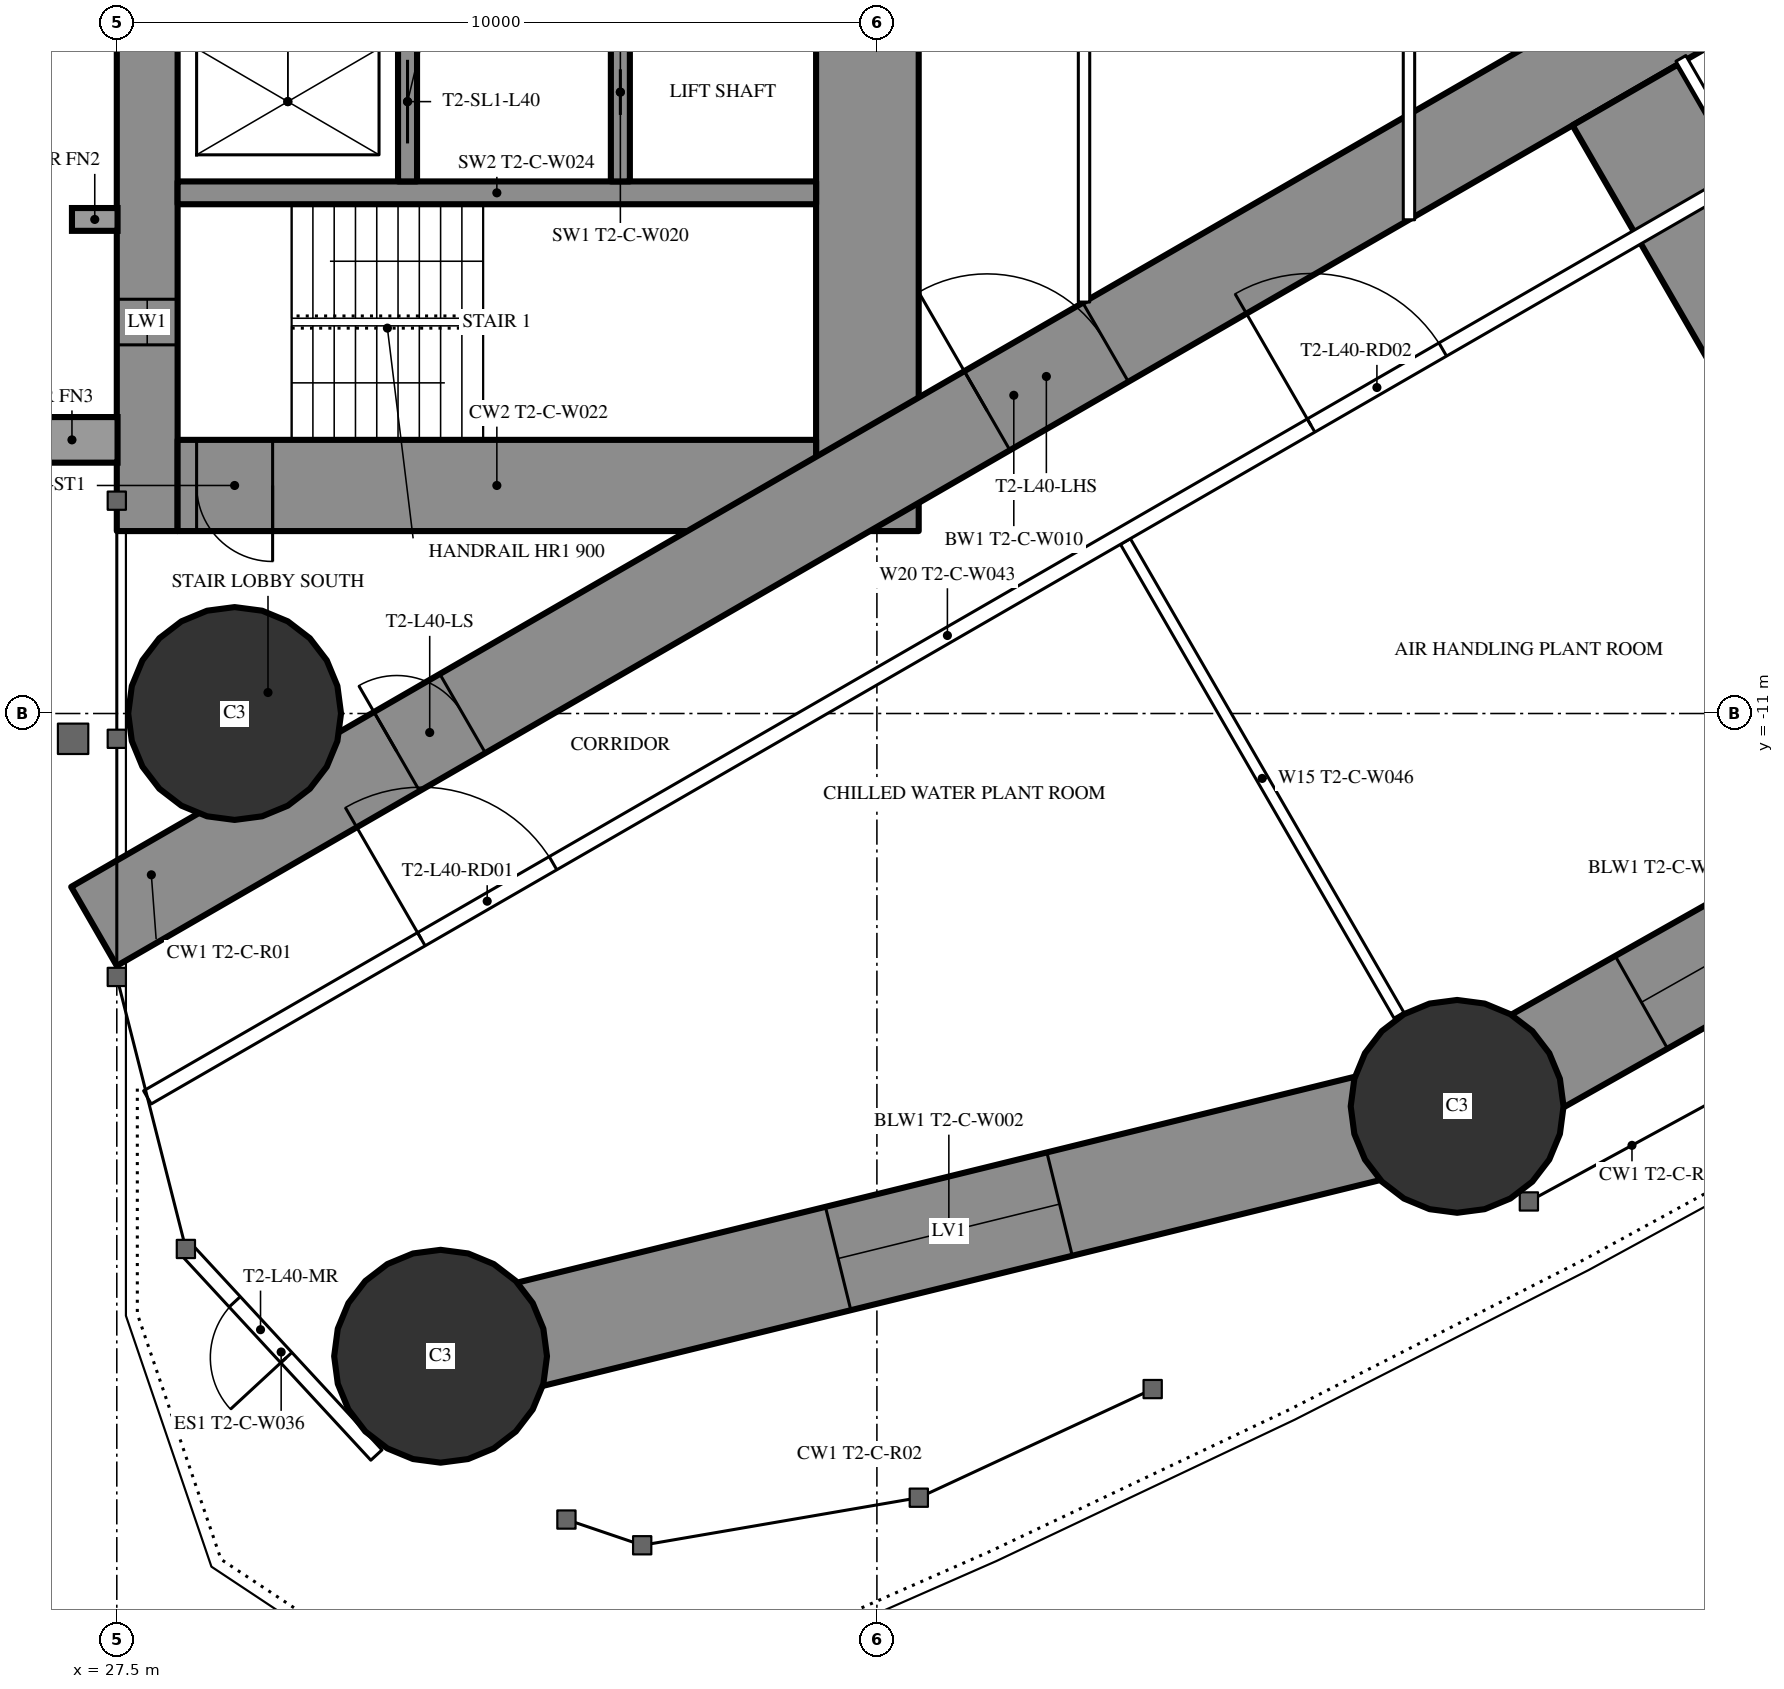
"""IFC4 building model, lengths in metres.
Left out: names, types, materials, properties, quantities, classifications, styles, units other than length and angle.
Written with IfcOpenShell. Run it as: python <this file> out.ifc"""

import sys

from ifc_helpers import new_model, si_unit, direction, frame, frame_2d, origin, origin_2d, place, context, subcontext, project, spatial, rectangle, circle, extrude, element, fill, save


model = new_model("IFC4")
c1 = context("Model", 3, precision=1e-05, world=origin(), true_north=direction((0.0, 1.0)))
c2 = subcontext(c1, "Body", "Model", "MODEL_VIEW")
j1 = project(units=[si_unit("LENGTHUNIT", "METRE"), si_unit("PLANEANGLEUNIT", "RADIAN")], contexts=[c1])
p1 = place(None, origin())
s1 = spatial("IfcSite", under=j1, at=p1, CompositionType="ELEMENT")
p2 = place(p1, origin())
s2 = spatial("IfcBuilding", under=s1, at=p2, CompositionType="ELEMENT")
p3 = place(p2, frame((0.0, 0.0, 152.7)))
s3 = spatial("IfcBuildingStorey", under=s2, at=p3, CompositionType="ELEMENT", Elevation=152.7)
for number, where, z_axis, x_axis in (
    (1, (31.76, -19.456, 0.0), (0.0, 0.0, 1.0), (1.0, 0.0, 0.0)),
    (2, (29.05, -11.0, 0.0), (0.0, 0.0, 1.0), (1.0, 0.0, 0.0)),
    (3, (45.134, -16.168, 0.0), (0.0, 0.0, 1.0), (1.0, 0.0, 0.0)),
):
    element("IfcColumn", number, at=place(p3, frame(where, z_axis=z_axis, x_axis=x_axis)), inside=s3, PredefinedType="COLUMN", context=c2, shape_type="SweptSolid", body=[
        extrude(circle(Radius=1.4, at=origin_2d()), origin(), (0.0, 0.0, 1.0), 3.6),
    ])
p4 = place(p3, frame((27.9, -8.6, 0.0), z_axis=(0.0, 0.0, 1.0), x_axis=(0.0, 1.0, 0.0)))
e4 = element("IfcWall", 4, at=p4, inside=s3, PredefinedType="SHEAR", context=c2, shape_type="SweptSolid", body=[
    extrude(rectangle(XDim=17.2, YDim=0.8, at=frame_2d((8.6, 0.0))), origin(), (0.0, 0.0, 1.0), 3.6),
])
p5 = place(p4, frame((2.45, 0.0, 0.6)))
e5 = element("IfcOpeningElement", 5, at=p5, cuts=e4, PredefinedType="OPENING", context=c2, shape_type="SweptSolid", body=[
    extrude(rectangle(XDim=0.6, YDim=2.1, at=frame_2d((0.3, 1.05))), frame((0.0, 0.41, 0.0), z_axis=(0.0, -1.0, 0.0), x_axis=(1.0, 0.0, 0.0)), (0.0, 0.0, 1.0), 0.82),
])
p6 = place(p4, frame((14.15, 0.0, 0.6)))
e6 = element("IfcOpeningElement", 6, at=p6, cuts=e4, PredefinedType="OPENING", context=c2, shape_type="SweptSolid", body=[
    extrude(rectangle(XDim=0.6, YDim=2.1, at=frame_2d((0.3, 1.05))), frame((0.0, 0.41, 0.0), z_axis=(0.0, -1.0, 0.0), x_axis=(1.0, 0.0, 0.0)), (0.0, 0.0, 1.0), 0.82),
])
p7 = place(p3, frame((37.375, -8.6, 0.0), z_axis=(0.0, 0.0, 1.0), x_axis=(0.0, 1.0, 0.0)))
e7 = element("IfcWall", 7, at=p7, inside=s3, PredefinedType="SHEAR", context=c2, shape_type="SweptSolid", body=[
    extrude(rectangle(XDim=17.2, YDim=1.35, at=frame_2d((8.6, 0.0))), origin(), (0.0, 0.0, 1.0), 3.6),
])
p8 = place(p7, frame((7.7, 0.0, 0.0)))
e8 = element("IfcOpeningElement", 8, at=p8, cuts=e7, PredefinedType="OPENING", context=c2, shape_type="SweptSolid", body=[
    extrude(rectangle(XDim=1.8, YDim=2.2, at=frame_2d((0.9, 1.1))), frame((0.0, 0.685, 0.0), z_axis=(0.0, -1.0, 0.0), x_axis=(1.0, 0.0, 0.0)), (0.0, 0.0, 1.0), 1.37),
])
p9 = place(p3, frame((28.3, -8.0, 0.0), z_axis=(0.0, 0.0, 1.0), x_axis=(1.0, 0.0, 0.0)))
e9 = element("IfcWall", 9, at=p9, inside=s3, PredefinedType="SHEAR", context=c2, shape_type="SweptSolid", body=[
    extrude(rectangle(XDim=8.4, YDim=1.2, at=frame_2d((4.2, 0.0))), origin(), (0.0, 0.0, 1.0), 3.6),
])
p10 = place(p9, frame((0.25, 0.0, 0.0)))
e10 = element("IfcOpeningElement", 10, at=p10, cuts=e9, PredefinedType="OPENING", context=c2, shape_type="SweptSolid", body=[
    extrude(rectangle(XDim=1.0, YDim=2.2, at=frame_2d((0.5, 1.1))), frame((0.0, 0.61, 0.0), z_axis=(0.0, -1.0, 0.0), x_axis=(1.0, 0.0, 0.0)), (0.0, 0.0, 1.0), 1.22),
])
p11 = place(p3, frame((28.3, -4.15, 0.0), z_axis=(0.0, 0.0, 1.0), x_axis=(1.0, 0.0, 0.0)))
e11 = element("IfcWall", 11, at=p11, inside=s3, PredefinedType="SHEAR", context=c2, shape_type="SweptSolid", body=[
    extrude(rectangle(XDim=8.4, YDim=0.3, at=frame_2d((4.2, 0.0))), origin(), (0.0, 0.0, 1.0), 3.6),
])
p12 = place(p3, frame((31.325, -4.0, 0.0), z_axis=(0.0, 0.0, 1.0), x_axis=(0.0, 1.0, 0.0)))
e12 = element("IfcWall", 12, at=p12, inside=s3, PredefinedType="SHEAR", context=c2, shape_type="SweptSolid", body=[
    extrude(rectangle(XDim=2.1, YDim=0.25, at=frame_2d((1.05, 0.0))), origin(), (0.0, 0.0, 1.0), 3.6),
])
p13 = place(p12, frame((0.5, 0.0, 0.0)))
e13 = element("IfcOpeningElement", 13, at=p13, cuts=e12, PredefinedType="OPENING", context=c2, shape_type="SweptSolid", body=[
    extrude(rectangle(XDim=1.1, YDim=2.2, at=frame_2d((0.55, 1.1))), frame((0.0, 0.135, 0.0), z_axis=(0.0, -1.0, 0.0), x_axis=(1.0, 0.0, 0.0)), (0.0, 0.0, 1.0), 0.27),
])
p14 = place(p3, frame((34.125, -4.0, 0.0), z_axis=(0.0, 0.0, 1.0), x_axis=(0.0, 1.0, 0.0)))
e14 = element("IfcWall", 14, at=p14, inside=s3, PredefinedType="SHEAR", context=c2, shape_type="SweptSolid", body=[
    extrude(rectangle(XDim=2.35, YDim=0.25, at=frame_2d((1.175, 0.0))), origin(), (0.0, 0.0, 1.0), 3.6),
])
p15 = place(p14, frame((0.875, 0.0, 0.0)))
e15 = element("IfcOpeningElement", 15, at=p15, cuts=e14, PredefinedType="OPENING", context=c2, shape_type="SweptSolid", body=[
    extrude(rectangle(XDim=0.6, YDim=2.0, at=frame_2d((0.3, 1.0))), frame((0.0, 0.135, 0.0), z_axis=(0.0, -1.0, 0.0), x_axis=(1.0, 0.0, 0.0)), (0.0, 0.0, 1.0), 0.27),
])
p16 = place(p3, frame((27.2, -13.8, 0.0), z_axis=(0.0, 0.0, 1.0), x_axis=(0.866027159892, 0.499996958321, 0.0)))
e16 = element("IfcWall", 16, at=p16, inside=s3, PredefinedType="SHEAR", context=c2, shape_type="SweptSolid", body=[
    extrude(rectangle(XDim=27.947, YDim=1.2, at=frame_2d((13.973, 0.0))), origin(), (0.0, 0.0, 1.0), 3.6),
])
p17 = place(p16, frame((4.6, 0.0, 0.0)))
e17 = element("IfcOpeningElement", 17, at=p17, cuts=e16, PredefinedType="OPENING", context=c2, shape_type="SweptSolid", body=[
    extrude(rectangle(XDim=1.0, YDim=2.2, at=frame_2d((0.5, 1.1))), frame((0.0, 0.61, 0.0), z_axis=(0.0, -1.0, 0.0), x_axis=(1.0, 0.0, 0.0)), (0.0, 0.0, 1.0), 1.22),
])
p18 = place(p16, frame((13.568, 0.0, 0.0)))
e18 = element("IfcOpeningElement", 18, at=p18, cuts=e16, PredefinedType="OPENING", context=c2, shape_type="SweptSolid", body=[
    extrude(rectangle(XDim=1.8, YDim=2.04, at=frame_2d((0.9, 1.02))), frame((0.0, 0.61, 0.0), z_axis=(0.0, -1.0, 0.0), x_axis=(1.0, 0.0, 0.0)), (0.0, 0.0, 1.0), 1.22),
])
p19 = place(p3, frame((47.345, -2.862, 0.0), z_axis=(0.0, 0.0, 1.0), x_axis=(0.500012973899, -0.866017913171, 0.0)))
e19 = element("IfcWall", 19, at=p19, inside=s3, PredefinedType="SHEAR", context=c2, shape_type="SweptSolid", body=[
    extrude(rectangle(XDim=10.499, YDim=1.6, at=frame_2d((5.25, 0.0))), origin(), (0.0, 0.0, 1.0), 3.6),
])
p20 = place(p19, frame((5.087, 0.0, 0.0)))
e20 = element("IfcOpeningElement", 20, at=p20, cuts=e19, PredefinedType="OPENING", context=c2, shape_type="SweptSolid", body=[
    extrude(rectangle(XDim=1.0, YDim=2.2, at=frame_2d((0.5, 1.1))), frame((0.0, 0.81, 0.0), z_axis=(0.0, -1.0, 0.0), x_axis=(1.0, 0.0, 0.0)), (0.0, 0.0, 1.0), 1.62),
])
p21 = place(p3, frame((31.76, -19.456, 0.0), z_axis=(0.0, 0.0, 1.0), x_axis=(0.971093253227, 0.238700426344, 0.0)))
e21 = element("IfcWall", 21, at=p21, inside=s3, PredefinedType="SHEAR", context=c2, shape_type="SweptSolid", body=[
    extrude(rectangle(XDim=13.772, YDim=1.4, at=frame_2d((6.886, 0.0))), origin(), (0.0, 0.0, 1.0), 3.6),
])
p22 = place(p21, frame((5.386, 0.0, 0.6)))
e22 = element("IfcOpeningElement", 22, at=p22, cuts=e21, PredefinedType="OPENING", context=c2, shape_type="SweptSolid", body=[
    extrude(rectangle(XDim=3.0, YDim=1.2, at=frame_2d((1.5, 0.6))), frame((0.0, 0.71, 0.0), z_axis=(0.0, -1.0, 0.0), x_axis=(1.0, 0.0, 0.0)), (0.0, 0.0, 1.0), 1.42),
])
p23 = place(p3, frame((45.134, -16.168, 0.0), z_axis=(0.0, 0.0, 1.0), x_axis=(0.870721990329, 0.491775574381, 0.0)))
e23 = element("IfcWall", 23, at=p23, inside=s3, PredefinedType="SHEAR", context=c2, shape_type="SweptSolid", body=[
    extrude(rectangle(XDim=8.569, YDim=1.4, at=frame_2d((4.284, 0.0))), origin(), (0.0, 0.0, 1.0), 3.6),
])
p24 = place(p23, frame((2.784, 0.0, 0.6)))
e24 = element("IfcOpeningElement", 24, at=p24, cuts=e23, PredefinedType="OPENING", context=c2, shape_type="SweptSolid", body=[
    extrude(rectangle(XDim=3.0, YDim=1.2, at=frame_2d((1.5, 0.6))), frame((0.0, 0.71, 0.0), z_axis=(0.0, -1.0, 0.0), x_axis=(1.0, 0.0, 0.0)), (0.0, 0.0, 1.0), 1.42),
])
p25 = place(p3, frame((30.916, -20.756, 0.0), z_axis=(0.0, 0.0, 1.0), x_axis=(-0.678826386316, 0.734298806509, 0.0)))
e25 = element("IfcWall", 25, at=p25, inside=s3, PredefinedType="STANDARD", context=c2, shape_type="SweptSolid", body=[
    extrude(rectangle(XDim=3.693, YDim=0.2, at=frame_2d((1.846, 0.0))), origin(), (0.0, 0.0, 1.0), 3.35),
])
p26 = place(p25, frame((1.746, 0.0, 0.0)))
e26 = element("IfcOpeningElement", 26, at=p26, cuts=e25, PredefinedType="OPENING", context=c2, shape_type="SweptSolid", body=[
    extrude(rectangle(XDim=1.0, YDim=2.2, at=frame_2d((0.5, 1.1))), frame((0.0, 0.11, 0.0), z_axis=(0.0, -1.0, 0.0), x_axis=(1.0, 0.0, 0.0)), (0.0, 0.0, 1.0), 0.22),
])
p27 = place(p3, frame((40.769, -8.737, 0.0), z_axis=(0.0, 0.0, 1.0), x_axis=(0.500013115284, -0.866017831539, 0.0)))
e27 = element("IfcWall", 27, at=p27, inside=s3, PredefinedType="PARTITIONING", context=c2, shape_type="SweptSolid", body=[
    extrude(rectangle(XDim=7.198, YDim=0.15, at=frame_2d((3.599, 0.0))), origin(), (0.0, 0.0, 1.0), 2.4),
])
p28 = place(p3, frame((27.903, -16.05, 0.0), z_axis=(0.0, 0.0, 1.0), x_axis=(0.86602417537, 0.500002127671, 0.0)))
e28 = element("IfcWall", 28, at=p28, inside=s3, PredefinedType="PARTITIONING", context=c2, shape_type="SweptSolid", body=[
    extrude(rectangle(XDim=24.307, YDim=0.2, at=frame_2d((12.153, 0.0))), origin(), (0.0, 0.0, 1.0), 3.35),
])
p29 = place(p28, frame((4.162, 0.0, 0.0)))
e29 = element("IfcOpeningElement", 29, at=p29, cuts=e28, PredefinedType="OPENING", context=c2, shape_type="SweptSolid", body=[
    extrude(rectangle(XDim=2.0, YDim=2.4, at=frame_2d((1.0, 1.2))), frame((0.0, 0.11, 0.0), z_axis=(0.0, -1.0, 0.0), x_axis=(1.0, 0.0, 0.0)), (0.0, 0.0, 1.0), 0.22),
])
p30 = place(p28, frame((17.678, 0.0, 0.0)))
e30 = element("IfcOpeningElement", 30, at=p30, cuts=e28, PredefinedType="OPENING", context=c2, shape_type="SweptSolid", body=[
    extrude(rectangle(XDim=2.0, YDim=2.4, at=frame_2d((1.0, 1.2))), frame((0.0, 0.11, 0.0), z_axis=(0.0, -1.0, 0.0), x_axis=(1.0, 0.0, 0.0)), (0.0, 0.0, 1.0), 0.22),
])
p31 = place(p3, frame((48.953, -3.897, 0.0), z_axis=(0.0, 0.0, 1.0), x_axis=(-0.499980071345, 0.866036909293, 0.0)))
e31 = element("IfcWall", 31, at=p31, inside=s3, PredefinedType="PARTITIONING", context=c2, shape_type="SweptSolid", body=[
    extrude(rectangle(XDim=1.75, YDim=0.15, at=frame_2d((0.875, 0.0))), origin(), (0.0, 0.0, 1.0), 3.35),
])
p32 = place(p3, frame((40.225, -5.587, 0.0), z_axis=(0.0, 0.0, 1.0), x_axis=(0.0, 1.0, 0.0)))
e32 = element("IfcWall", 32, at=p32, inside=s3, PredefinedType="PARTITIONING", context=c2, shape_type="SweptSolid", body=[
    extrude(rectangle(XDim=11.174, YDim=0.15, at=frame_2d((5.587, 0.0))), origin(), (0.0, 0.0, 1.0), 3.35),
])
p33 = place(p32, frame((4.687, 0.0, 0.0)))
e33 = element("IfcOpeningElement", 33, at=p33, cuts=e32, PredefinedType="OPENING", context=c2, shape_type="SweptSolid", body=[
    extrude(rectangle(XDim=1.8, YDim=2.2, at=frame_2d((0.9, 1.1))), frame((0.0, 0.085, 0.0), z_axis=(0.0, -1.0, 0.0), x_axis=(1.0, 0.0, 0.0)), (0.0, 0.0, 1.0), 0.17),
])
p34 = place(p3, frame((44.5, -4.505, 0.0), z_axis=(0.0, 0.0, 1.0), x_axis=(0.0, 1.0, 0.0)))
e34 = element("IfcWall", 34, at=p34, inside=s3, PredefinedType="PARTITIONING", context=c2, shape_type="SweptSolid", body=[
    extrude(rectangle(XDim=9.009, YDim=0.15, at=frame_2d((4.505, 0.0))), origin(), (0.0, 0.0, 1.0), 3.35),
])
p35 = place(p34, frame((4.005, 0.0, 0.0)))
e35 = element("IfcOpeningElement", 35, at=p35, cuts=e34, PredefinedType="OPENING", context=c2, shape_type="SweptSolid", body=[
    extrude(rectangle(XDim=1.0, YDim=2.2, at=frame_2d((0.5, 1.1))), frame((0.0, 0.085, 0.0), z_axis=(0.0, -1.0, 0.0), x_axis=(1.0, 0.0, 0.0)), (0.0, 0.0, 1.0), 0.17),
])
p36 = place(p22, origin())
e36 = element("IfcWindow", 36, at=p36, inside=s3, PartitioningType="SINGLE_PANEL", PredefinedType="WINDOW", context=c2, shape_type="SweptSolid", body=[
    extrude(rectangle(XDim=3.0, YDim=1.2, at=frame_2d((1.5, 0.6))), frame((0.0, 0.03, 0.0), z_axis=(0.0, -1.0, 0.0), x_axis=(1.0, 0.0, 0.0)), (0.0, 0.0, 1.0), 0.06),
])
fill(e22, e36)
p37 = place(p24, origin())
e37 = element("IfcWindow", 37, at=p37, inside=s3, PartitioningType="SINGLE_PANEL", PredefinedType="WINDOW", context=c2, shape_type="SweptSolid", body=[
    extrude(rectangle(XDim=3.0, YDim=1.2, at=frame_2d((1.5, 0.6))), frame((0.0, 0.03, 0.0), z_axis=(0.0, -1.0, 0.0), x_axis=(1.0, 0.0, 0.0)), (0.0, 0.0, 1.0), 0.06),
])
fill(e24, e37)
p38 = place(p26, origin())
e38 = element("IfcDoor", 38, at=p38, inside=s3, OperationType="SINGLE_SWING_LEFT", PredefinedType="DOOR", context=c2, shape_type="SweptSolid", body=[
    extrude(rectangle(XDim=1.0, YDim=2.2, at=frame_2d((0.5, 1.1))), frame((0.0, 0.025, 0.0), z_axis=(0.0, -1.0, 0.0), x_axis=(1.0, 0.0, 0.0)), (0.0, 0.0, 1.0), 0.05),
])
fill(e26, e38)
p39 = place(p29, origin())
e39 = element("IfcDoor", 39, at=p39, inside=s3, OperationType="DOUBLE_DOOR_SINGLE_SWING", PredefinedType="DOOR", context=c2, shape_type="SweptSolid", body=[
    extrude(rectangle(XDim=2.0, YDim=2.4, at=frame_2d((1.0, 1.2))), frame((0.0, 0.025, 0.0), z_axis=(0.0, -1.0, 0.0), x_axis=(1.0, 0.0, 0.0)), (0.0, 0.0, 1.0), 0.05),
])
fill(e29, e39)
p40 = place(p30, origin())
e40 = element("IfcDoor", 40, at=p40, inside=s3, OperationType="DOUBLE_DOOR_SINGLE_SWING", PredefinedType="DOOR", context=c2, shape_type="SweptSolid", body=[
    extrude(rectangle(XDim=2.0, YDim=2.4, at=frame_2d((1.0, 1.2))), frame((0.0, 0.025, 0.0), z_axis=(0.0, -1.0, 0.0), x_axis=(1.0, 0.0, 0.0)), (0.0, 0.0, 1.0), 0.05),
])
fill(e30, e40)
p41 = place(p17, origin())
e41 = element("IfcDoor", 41, at=p41, inside=s3, OperationType="SINGLE_SWING_LEFT", PredefinedType="DOOR", context=c2, shape_type="SweptSolid", body=[
    extrude(rectangle(XDim=1.0, YDim=2.2, at=frame_2d((0.5, 1.1))), frame((0.0, 0.025, 0.0), z_axis=(0.0, -1.0, 0.0), x_axis=(1.0, 0.0, 0.0)), (0.0, 0.0, 1.0), 0.05),
])
fill(e17, e41)
p42 = place(p18, origin())
e42 = element("IfcDoor", 42, at=p42, inside=s3, OperationType="DOUBLE_DOOR_SINGLE_SWING", PredefinedType="DOOR", context=c2, shape_type="SweptSolid", body=[
    extrude(rectangle(XDim=1.8, YDim=2.04, at=frame_2d((0.9, 1.02))), frame((0.0, 0.025, 0.0), z_axis=(0.0, -1.0, 0.0), x_axis=(1.0, 0.0, 0.0)), (0.0, 0.0, 1.0), 0.05),
])
fill(e18, e42)
p43 = place(p10, origin())
e43 = element("IfcDoor", 43, at=p43, inside=s3, OperationType="SINGLE_SWING_RIGHT", PredefinedType="DOOR", context=c2, shape_type="SweptSolid", body=[
    extrude(rectangle(XDim=1.0, YDim=2.2, at=frame_2d((0.5, 1.1))), frame((0.0, 0.025, 0.0), z_axis=(0.0, -1.0, 0.0), x_axis=(1.0, 0.0, 0.0)), (0.0, 0.0, 1.0), 0.05),
])
fill(e10, e43)
p44 = place(p13, origin())
e44 = element("IfcDoor", 44, at=p44, inside=s3, OperationType="SLIDING_TO_LEFT", PredefinedType="USERDEFINED", context=c2, shape_type="SweptSolid", body=[
    extrude(rectangle(XDim=1.1, YDim=2.2, at=frame_2d((0.55, 1.1))), frame((0.0, 0.025, 0.0), z_axis=(0.0, -1.0, 0.0), x_axis=(1.0, 0.0, 0.0)), (0.0, 0.0, 1.0), 0.05),
])
fill(e13, e44)
p45 = place(p15, origin())
e45 = element("IfcDoor", 45, at=p45, inside=s3, OperationType="SLIDING_TO_LEFT", PredefinedType="DOOR", context=c2, shape_type="SweptSolid", body=[
    extrude(rectangle(XDim=0.6, YDim=2.0, at=frame_2d((0.3, 1.0))), frame((0.0, 0.025, 0.0), z_axis=(0.0, -1.0, 0.0), x_axis=(1.0, 0.0, 0.0)), (0.0, 0.0, 1.0), 0.05),
])
fill(e15, e45)
p46 = place(p5, origin())
e46 = element("IfcWindow", 46, at=p46, inside=s3, PartitioningType="SINGLE_PANEL", PredefinedType="WINDOW", context=c2, shape_type="SweptSolid", body=[
    extrude(rectangle(XDim=0.6, YDim=2.1, at=frame_2d((0.3, 1.05))), frame((0.0, 0.03, 0.0), z_axis=(0.0, -1.0, 0.0), x_axis=(1.0, 0.0, 0.0)), (0.0, 0.0, 1.0), 0.06),
])
fill(e5, e46)
save(model, sys.argv[1])
